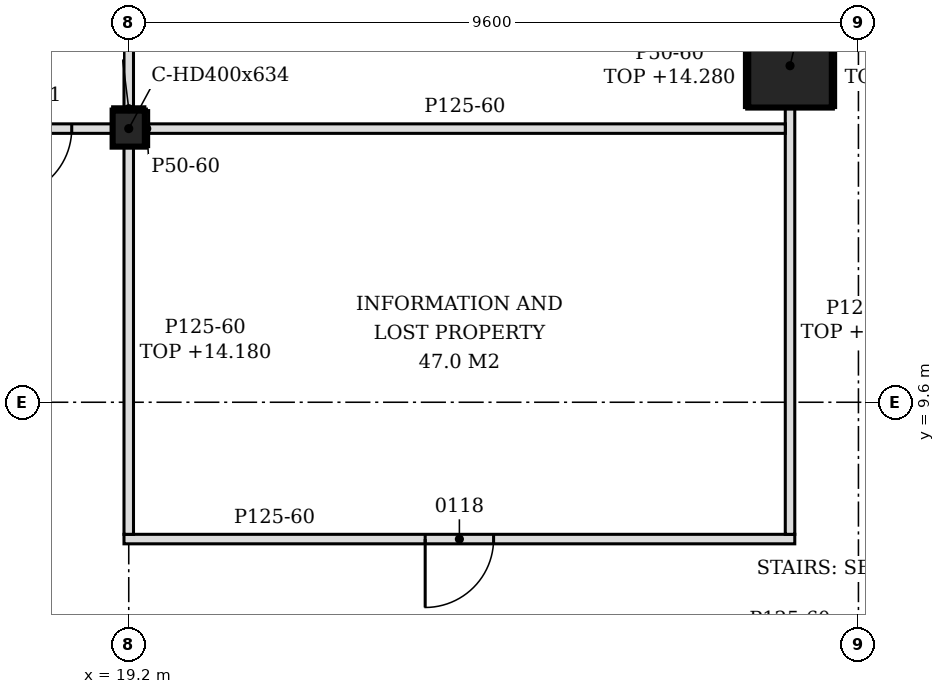
"""IFC4 building model, lengths in metres.
Left out: names, types, materials, properties, quantities, classifications, styles, units other than length and angle.
Written with IfcOpenShell. Run it as: python <this file> out.ifc"""

import sys

from ifc_helpers import new_model, si_unit, direction, frame, frame_2d, origin, origin_2d, place, context, subcontext, project, spatial, polyline, rectangle, hollow_rectangle, i_section, outline, extrude, element, fill, save


model = new_model("IFC4")
c1 = context("Model", 3, precision=1e-05, world=origin(), true_north=direction((0.0, 1.0)))
c2 = subcontext(c1, "Body", "Model", "MODEL_VIEW")
j1 = project(units=[si_unit("LENGTHUNIT", "METRE"), si_unit("PLANEANGLEUNIT", "RADIAN")], contexts=[c1])
p1 = place(None, origin())
s1 = spatial("IfcSite", under=j1, at=p1, CompositionType="ELEMENT")
p2 = place(p1, origin())
s2 = spatial("IfcBuilding", under=s1, at=p2, CompositionType="ELEMENT")
p3 = place(p2, frame((0.0, 0.0, 9.0)))
s3 = spatial("IfcBuildingStorey", under=s2, at=p3, CompositionType="ELEMENT", Elevation=9.0)
p4 = place(p3, frame((27.9, 14.027, -0.2), z_axis=(0.0, 0.0, 1.0), x_axis=(1.0, 0.0, 0.0)))
e1 = element("IfcColumn", 1, at=p4, inside=s3, PredefinedType="COLUMN", context=c2, shape_type="SweptSolid", body=[
    extrude(hollow_rectangle(XDim=1.1, YDim=1.1, WallThickness=0.06, at=origin_2d()), origin(), (0.0, 0.0, 1.0), 6.0),
])
p5 = place(p3, frame((19.2, 13.2, -0.2), z_axis=(0.0, 0.0, 1.0), x_axis=(1.0, 0.0, 0.0)))
e2 = element("IfcColumn", 2, at=p5, inside=s3, PredefinedType="COLUMN", context=c2, shape_type="SweptSolid", body=[
    extrude(i_section(OverallWidth=0.424, OverallDepth=0.474, WebThickness=0.048, FlangeThickness=0.077, FilletRadius=0.015, at=origin_2d()), origin(), (0.0, 0.0, 1.0), 6.0),
])
p6 = place(p3, frame((19.137, 7.8, 0.0), z_axis=(0.0, 0.0, 1.0), x_axis=(1.0, 0.0, 0.0)))
e3 = element("IfcWall", 3, at=p6, inside=s3, PredefinedType="PARTITIONING", context=c2, shape_type="SweptSolid", body=[
    extrude(outline(polyline([(0.0, 0.0), (8.825, 0.0), (8.825, 5.28), (8.613, 5.28), (8.611, 5.8), (4.962, 5.8), (4.96, 5.28), (4.762, 5.28), (4.76, 5.8), (0.212, 5.8), (0.21, 5.18), (0.0, 5.18), (0.0, 0.0)])), frame((0.0, 0.062, 0.0), z_axis=(0.0, -1.0, 0.0), x_axis=(1.0, 0.0, 0.0)), (0.0, 0.0, 1.0), 0.125),
])
p7 = place(p6, frame((3.962, 0.0, 0.0)))
e4 = element("IfcOpeningElement", 4, at=p7, cuts=e3, PredefinedType="OPENING", context=c2, shape_type="SweptSolid", body=[
    extrude(rectangle(XDim=0.9, YDim=2.1, at=frame_2d((0.45, 1.05))), frame((0.0, 0.073, 0.0), z_axis=(0.0, -1.0, 0.0), x_axis=(1.0, 0.0, 0.0)), (0.0, 0.0, 1.0), 0.145),
])
p8 = place(p3, frame((19.2, 7.863, 0.0), z_axis=(0.0, 0.0, 1.0), x_axis=(0.0, 1.0, 0.0)))
e5 = element("IfcWall", 5, at=p8, inside=s3, PredefinedType="PARTITIONING", context=c2, shape_type="SweptSolid", body=[
    extrude(rectangle(XDim=5.1, YDim=0.125, at=frame_2d((2.55, 0.0))), origin(), (0.0, 0.0, 1.0), 5.18),
])
p9 = place(p3, frame((27.9, 7.863, 0.0), z_axis=(0.0, 0.0, 1.0), x_axis=(0.0, 1.0, 0.0)))
e6 = element("IfcWall", 6, at=p9, inside=s3, PredefinedType="PARTITIONING", context=c2, shape_type="SweptSolid", body=[
    extrude(rectangle(XDim=5.615, YDim=0.125, at=frame_2d((2.807, 0.0))), origin(), (0.0, 0.0, 1.0), 5.28),
])
p10 = place(p3, frame((7.412, 13.2, 0.0), z_axis=(0.0, 0.0, 1.0), x_axis=(1.0, 0.0, 0.0)))
e7 = element("IfcWall", 7, at=p10, inside=s3, PredefinedType="PARTITIONING", context=c2, shape_type="SweptSolid", body=[
    extrude(rectangle(XDim=11.576, YDim=0.125, at=frame_2d((5.788, 0.0))), origin(), (0.0, 0.0, 1.0), 5.18),
])
p11 = place(p10, frame((5.293, 0.0, 0.0)))
e8 = element("IfcOpeningElement", 8, at=p11, cuts=e7, PredefinedType="OPENING", context=c2, shape_type="SweptSolid", body=[
    extrude(rectangle(XDim=0.8, YDim=2.1, at=frame_2d((0.4, 1.05))), frame((0.0, 0.073, 0.0), z_axis=(0.0, -1.0, 0.0), x_axis=(1.0, 0.0, 0.0)), (0.0, 0.0, 1.0), 0.145),
])
p12 = place(p10, frame((10.138, 0.0, 0.0)))
e9 = element("IfcOpeningElement", 9, at=p12, cuts=e7, PredefinedType="OPENING", context=c2, shape_type="SweptSolid", body=[
    extrude(rectangle(XDim=0.9, YDim=2.1, at=frame_2d((0.45, 1.05))), frame((0.0, 0.073, 0.0), z_axis=(0.0, -1.0, 0.0), x_axis=(1.0, 0.0, 0.0)), (0.0, 0.0, 1.0), 0.145),
])
p13 = place(p3, frame((19.412, 13.2, 0.0), z_axis=(0.0, 0.0, 1.0), x_axis=(1.0, 0.0, 0.0)))
e10 = element("IfcWall", 10, at=p13, inside=s3, PredefinedType="PARTITIONING", context=c2, shape_type="SweptSolid", body=[
    extrude(outline(polyline([(0.0, 0.0), (8.425, 0.0), (8.426, 5.28), (8.338, 5.28), (8.336, 5.8), (4.678, 5.8), (4.676, 5.38), (4.498, 5.38), (4.496, 5.8), (0.0, 5.8), (0.0, 0.0)])), frame((0.0, 0.062, 0.0), z_axis=(0.0, -1.0, 0.0), x_axis=(1.0, 0.0, 0.0)), (0.0, 0.0, 1.0), 0.125),
])
p14 = place(p3, frame((19.2, 13.437, 0.0), z_axis=(0.0, 0.0, 1.0), x_axis=(0.0, 1.0, 0.0)))
e11 = element("IfcWall", 11, at=p14, inside=s3, PredefinedType="PARTITIONING", context=c2, shape_type="SweptSolid", body=[
    extrude(rectangle(XDim=9.113, YDim=0.125, at=frame_2d((4.557, 0.0))), origin(), (0.0, 0.0, 1.0), 5.28),
])
p15 = place(p3, frame((19.437, 12.963, 0.0), z_axis=(0.0, 0.0, 1.0), x_axis=(0.0, 1.0, 0.0)))
e12 = element("IfcWall", 12, at=p15, inside=s3, PredefinedType="PARTITIONING", context=c2, shape_type="SweptSolid", body=[
    extrude(rectangle(XDim=0.474, YDim=0.05, at=frame_2d((0.237, 0.0))), origin(), (0.0, 0.0, 1.0), 5.8),
])
for number, where, z_axis, x_axis in (
    (13, (27.325, 13.477, 0.0), (0.0, 0.0, 1.0), (0.0, 1.0, 0.0)),
    (14, (28.475, 13.477, 0.0), (0.0, 0.0, 1.0), (0.0, 1.0, 0.0)),
):
    element("IfcWall", number, at=place(p3, frame(where, z_axis=z_axis, x_axis=x_axis)), inside=s3, PredefinedType="PARTITIONING", context=c2, shape_type="SweptSolid", body=[
        extrude(rectangle(XDim=1.1, YDim=0.05, at=frame_2d((0.55, 0.0))), origin(), (0.0, 0.0, 1.0), 5.28),
    ])
p16 = place(p3, frame((18.988, 13.462, 0.0), z_axis=(0.0, 0.0, 1.0), x_axis=(1.0, 0.0, 0.0)))
e15 = element("IfcWall", 15, at=p16, inside=s3, PredefinedType="PARTITIONING", context=c2, shape_type="SweptSolid", body=[
    extrude(rectangle(XDim=0.424, YDim=0.05, at=frame_2d((0.212, 0.0))), origin(), (0.0, 0.0, 1.0), 5.28),
])
p17 = place(p12, frame((0.9, 0.0, 0.0), z_axis=(0.0, 0.0, 1.0), x_axis=(-1.0, 0.0, 0.0)))
e16 = element("IfcDoor", 16, at=p17, inside=s3, OperationType="SINGLE_SWING_RIGHT", PredefinedType="DOOR", context=c2, shape_type="SweptSolid", body=[
    extrude(rectangle(XDim=0.9, YDim=2.1, at=frame_2d((0.45, 1.05))), frame((0.0, 0.025, 0.0), z_axis=(0.0, -1.0, 0.0), x_axis=(1.0, 0.0, 0.0)), (0.0, 0.0, 1.0), 0.05),
])
fill(e9, e16)
p18 = place(p7, frame((0.9, 0.0, 0.0), z_axis=(0.0, 0.0, 1.0), x_axis=(-1.0, 0.0, 0.0)))
e17 = element("IfcDoor", 17, at=p18, inside=s3, OperationType="SINGLE_SWING_RIGHT", PredefinedType="DOOR", context=c2, shape_type="SweptSolid", body=[
    extrude(rectangle(XDim=0.9, YDim=2.1, at=frame_2d((0.45, 1.05))), frame((0.0, 0.025, 0.0), z_axis=(0.0, -1.0, 0.0), x_axis=(1.0, 0.0, 0.0)), (0.0, 0.0, 1.0), 0.05),
])
fill(e4, e17)
save(model, sys.argv[1])
